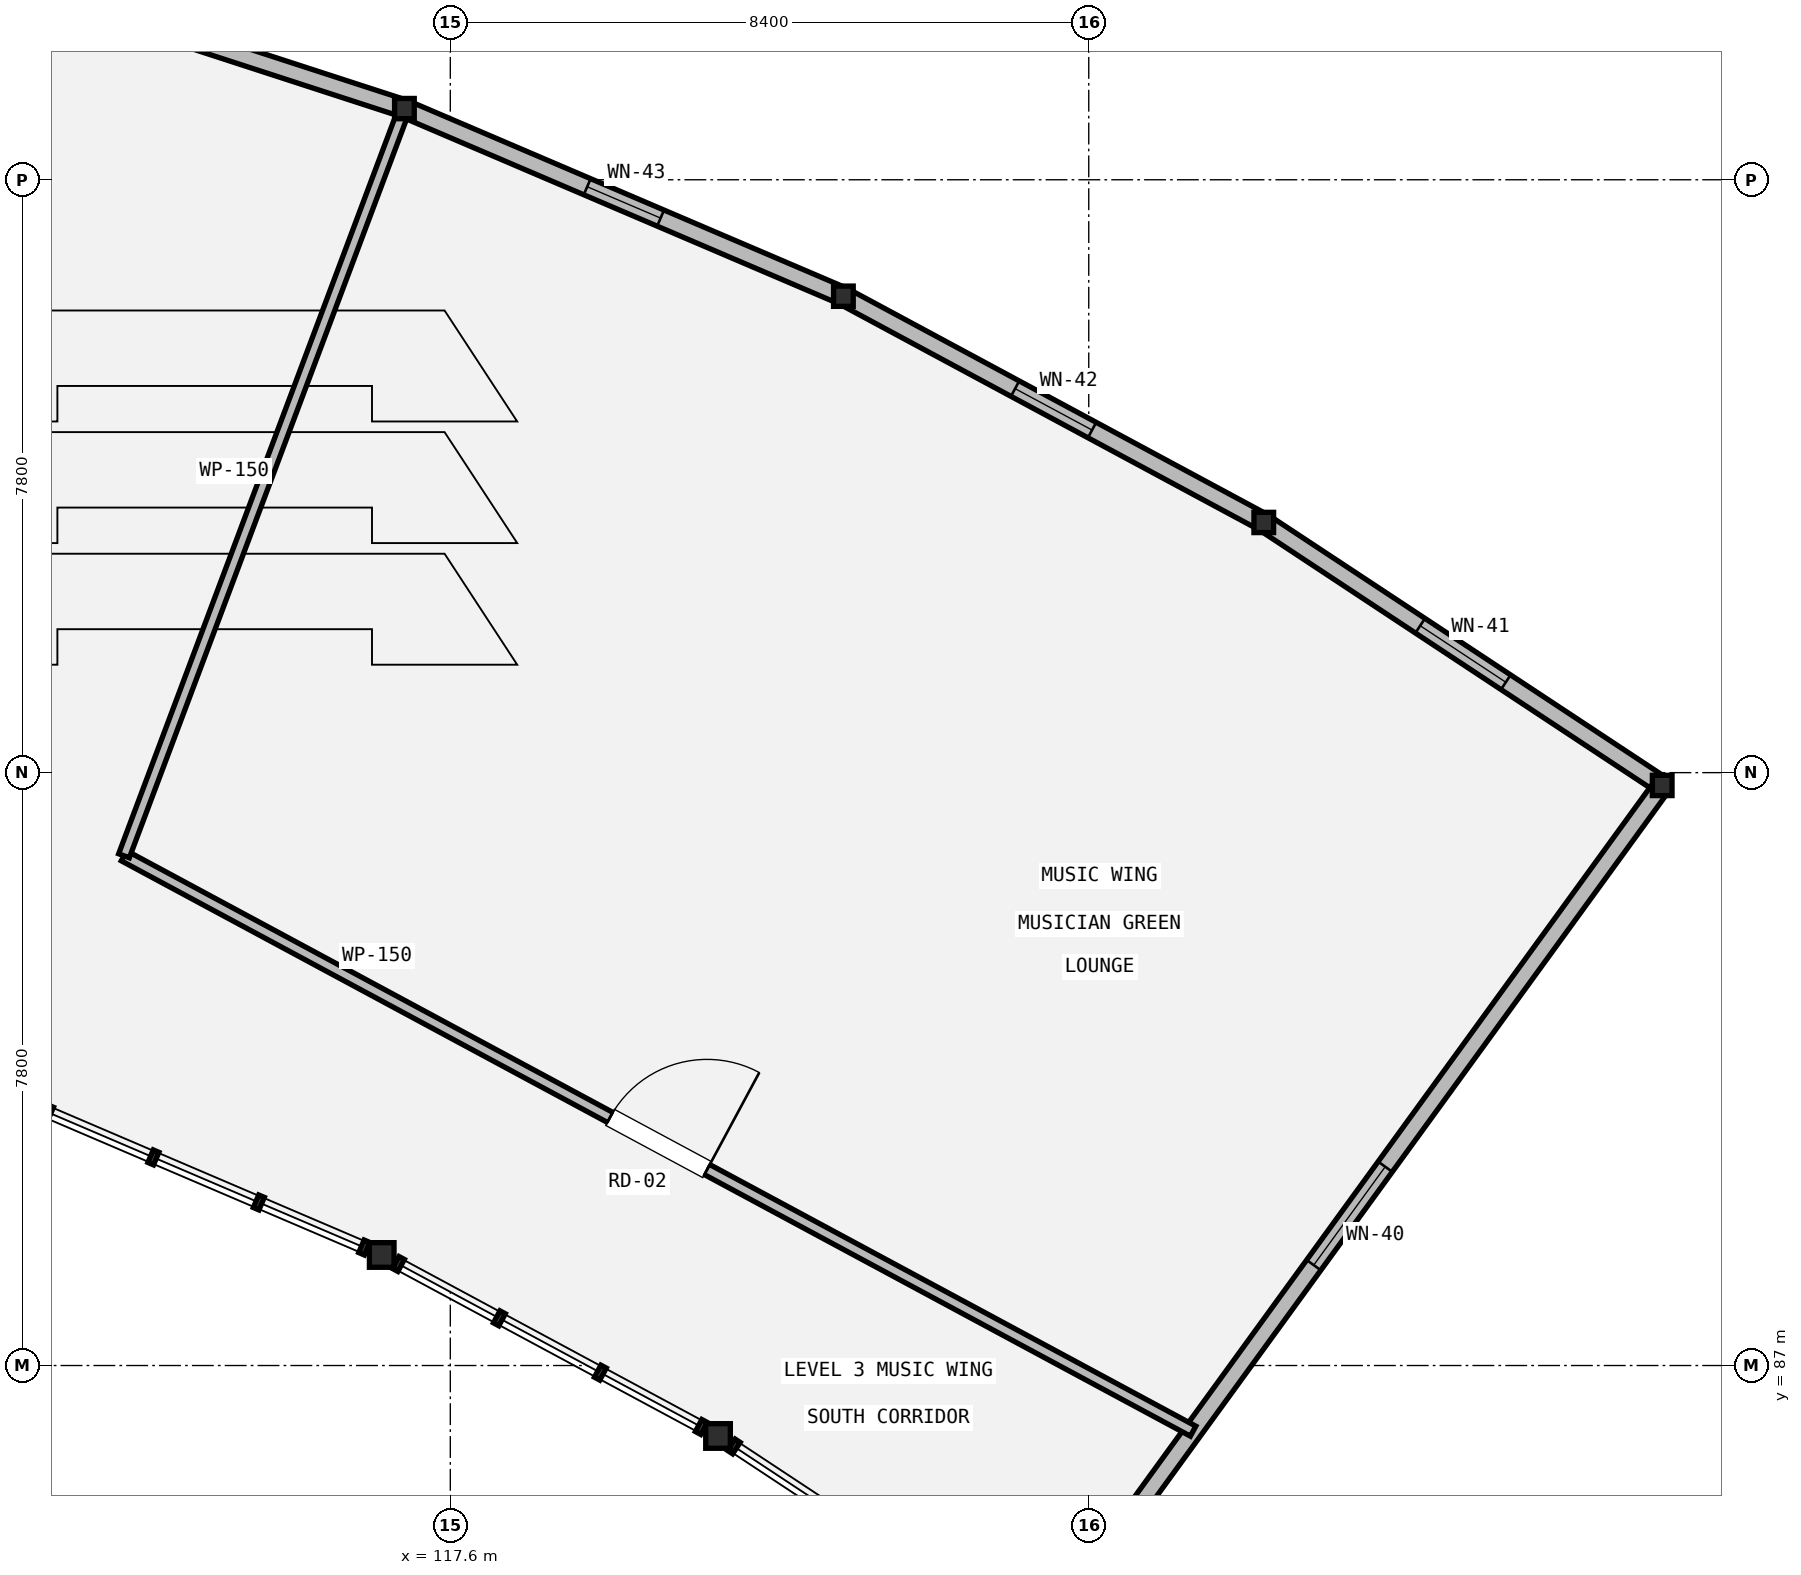
"""IFC4 building model, lengths in metres.
Left out: names, types, materials, properties, quantities, classifications, styles, units other than length and angle.
Written with IfcOpenShell. Run it as: python <this file> out.ifc"""

import sys

from ifc_helpers import new_model, si_unit, direction, frame, frame_2d, origin, origin_2d, place, context, subcontext, project, spatial, rectangle, hollow_circle, i_section, extrude, element, fill, save


model = new_model("IFC4")
c1 = context("Model", 3, precision=1e-05, world=origin(), true_north=direction((0.0, 1.0)))
c2 = subcontext(c1, "Body", "Model", "MODEL_VIEW")
j1 = project(units=[si_unit("LENGTHUNIT", "METRE"), si_unit("PLANEANGLEUNIT", "RADIAN")], contexts=[c1])
p1 = place(None, origin())
s1 = spatial("IfcSite", under=j1, at=p1, CompositionType="ELEMENT")
p2 = place(p1, origin())
s2 = spatial("IfcBuilding", under=s1, at=p2, CompositionType="ELEMENT")
p3 = place(p2, frame((0.0, 0.0, 15.0)))
s3 = spatial("IfcBuildingStorey", under=s2, at=p3, CompositionType="ELEMENT", Elevation=15.0)
p4 = place(p3, frame((116.996, 103.536, 0.0), z_axis=(0.0, 0.0, 1.0), x_axis=(1.0, 0.0, 0.0)))
e1 = element("IfcColumn", 1, at=p4, inside=s3, PredefinedType="COLUMN", context=c2, shape_type="SweptSolid", body=[
    extrude(i_section(OverallWidth=0.259, OverallDepth=0.267, WebThickness=0.013, FlangeThickness=0.021, FilletRadius=0.013, at=origin_2d()), origin(), (0.0, 0.0, 1.0), 4.2),
])
p5 = place(p3, frame((116.698, 88.454, 0.0), z_axis=(0.0, 0.0, 1.0), x_axis=(1.0, 0.0, 0.0)))
e2 = element("IfcColumn", 2, at=p5, inside=s3, PredefinedType="COLUMN", context=c2, shape_type="SweptSolid", body=[
    extrude(hollow_circle(Radius=0.162, WallThickness=0.012, at=origin_2d()), origin(), (0.0, 0.0, 1.0), 4.2),
])
p6 = place(p3, frame((122.772, 101.068, 0.0), z_axis=(0.0, 0.0, 1.0), x_axis=(1.0, 0.0, 0.0)))
e3 = element("IfcColumn", 3, at=p6, inside=s3, PredefinedType="COLUMN", context=c2, shape_type="SweptSolid", body=[
    extrude(i_section(OverallWidth=0.259, OverallDepth=0.267, WebThickness=0.013, FlangeThickness=0.021, FilletRadius=0.013, at=origin_2d()), origin(), (0.0, 0.0, 1.0), 4.2),
])
p7 = place(p3, frame((121.122, 86.073, 0.0), z_axis=(0.0, 0.0, 1.0), x_axis=(1.0, 0.0, 0.0)))
e4 = element("IfcColumn", 4, at=p7, inside=s3, PredefinedType="COLUMN", context=c2, shape_type="SweptSolid", body=[
    extrude(hollow_circle(Radius=0.162, WallThickness=0.012, at=origin_2d()), origin(), (0.0, 0.0, 1.0), 4.2),
])
for number, where, z_axis, x_axis in (
    (5, (128.303, 98.091, 0.0), (0.0, 0.0, 1.0), (1.0, 0.0, 0.0)),
    (6, (133.545, 94.631, 0.0), (0.0, 0.0, 1.0), (1.0, 0.0, 0.0)),
):
    element("IfcColumn", number, at=place(p3, frame(where, z_axis=z_axis, x_axis=x_axis)), inside=s3, PredefinedType="COLUMN", context=c2, shape_type="SweptSolid", body=[
        extrude(i_section(OverallWidth=0.259, OverallDepth=0.267, WebThickness=0.013, FlangeThickness=0.021, FilletRadius=0.013, at=origin_2d()), origin(), (0.0, 0.0, 1.0), 4.2),
    ])
p8 = place(p3, frame((111.023, 105.477, 0.0), z_axis=(0.0, 0.0, 1.0), x_axis=(0.951054348109, -0.309023667285, 0.0)))
e7 = element("IfcWall", 7, at=p8, inside=s3, PredefinedType="STANDARD", context=c2, shape_type="SweptSolid", body=[
    extrude(rectangle(XDim=6.281, YDim=0.23, at=frame_2d((3.14, 0.0))), origin(), (0.0, 0.0, 1.0), 3.477),
])
p9 = place(p3, frame((116.996, 103.536, 0.0), z_axis=(0.0, 0.0, 1.0), x_axis=(0.919540617607, -0.392994977793, 0.0)))
e8 = element("IfcWall", 8, at=p9, inside=s3, PredefinedType="STANDARD", context=c2, shape_type="SweptSolid", body=[
    extrude(rectangle(XDim=6.281, YDim=0.23, at=frame_2d((3.141, 0.0))), origin(), (0.0, 0.0, 1.0), 3.477),
])
p10 = place(p9, frame((2.615, 0.0, 0.9)))
e9 = element("IfcOpeningElement", 9, at=p10, cuts=e8, PredefinedType="OPENING", context=c2, shape_type="SweptSolid", body=[
    extrude(rectangle(XDim=1.05, YDim=1.35, at=frame_2d((0.525, 0.675))), frame((0.0, 0.125, 0.0), z_axis=(0.0, -1.0, 0.0), x_axis=(1.0, 0.0, 0.0)), (0.0, 0.0, 1.0), 0.25),
])
p11 = place(p3, frame((122.772, 101.068, 0.0), z_axis=(0.0, 0.0, 1.0), x_axis=(0.880582156138, -0.473893517883, 0.0)))
e10 = element("IfcWall", 10, at=p11, inside=s3, PredefinedType="STANDARD", context=c2, shape_type="SweptSolid", body=[
    extrude(rectangle(XDim=6.281, YDim=0.23, at=frame_2d((3.141, 0.0))), origin(), (0.0, 0.0, 1.0), 3.477),
])
p12 = place(p11, frame((2.565, 0.0, 0.9)))
e11 = element("IfcOpeningElement", 11, at=p12, cuts=e10, PredefinedType="OPENING", context=c2, shape_type="SweptSolid", body=[
    extrude(rectangle(XDim=1.15, YDim=1.4, at=frame_2d((0.575, 0.7))), frame((0.0, 0.125, 0.0), z_axis=(0.0, -1.0, 0.0), x_axis=(1.0, 0.0, 0.0)), (0.0, 0.0, 1.0), 0.25),
])
p13 = place(p3, frame((128.303, 98.091, 0.0), z_axis=(0.0, 0.0, 1.0), x_axis=(0.834571163011, -0.550900148729, 0.0)))
e12 = element("IfcWall", 12, at=p13, inside=s3, PredefinedType="STANDARD", context=c2, shape_type="SweptSolid", body=[
    extrude(rectangle(XDim=6.281, YDim=0.23, at=frame_2d((3.141, 0.0))), origin(), (0.0, 0.0, 1.0), 3.477),
])
p14 = place(p13, frame((2.466, 0.0, 0.9)))
e13 = element("IfcOpeningElement", 13, at=p14, cuts=e12, PredefinedType="OPENING", context=c2, shape_type="SweptSolid", body=[
    extrude(rectangle(XDim=1.35, YDim=2.2, at=frame_2d((0.675, 1.1))), frame((0.0, 0.125, 0.0), z_axis=(0.0, -1.0, 0.0), x_axis=(1.0, 0.0, 0.0)), (0.0, 0.0, 1.0), 0.25),
])
p15 = place(p3, frame((133.545, 94.631, 0.0), z_axis=(0.0, 0.0, 1.0), x_axis=(-0.587787980643, -0.809015012105, 0.0)))
e14 = element("IfcWall", 14, at=p15, inside=s3, PredefinedType="STANDARD", context=c2, shape_type="SweptSolid", body=[
    extrude(rectangle(XDim=14.0, YDim=0.23, at=frame_2d((7.0, 0.0))), origin(), (0.0, 0.0, 1.0), 3.477),
])
p16 = place(p15, frame((6.2, 0.0, 0.9)))
e15 = element("IfcOpeningElement", 15, at=p16, cuts=e14, PredefinedType="OPENING", context=c2, shape_type="SweptSolid", body=[
    extrude(rectangle(XDim=1.6, YDim=2.2, at=frame_2d((0.8, 1.1))), frame((0.0, 0.125, 0.0), z_axis=(0.0, -1.0, 0.0), x_axis=(1.0, 0.0, 0.0)), (0.0, 0.0, 1.0), 0.25),
])
p17 = place(p3, frame((113.307, 93.706, 0.0), z_axis=(0.0, 0.0, 1.0), x_axis=(0.880592290025, -0.473874686757, 0.0)))
e16 = element("IfcWall", 16, at=p17, inside=s3, PredefinedType="PARTITIONING", context=c2, shape_type="SweptSolid", body=[
    extrude(rectangle(XDim=15.974, YDim=0.15, at=frame_2d((7.987, 0.0))), origin(), (0.0, 0.0, 1.0), 3.477),
])
p18 = place(p17, frame((7.262, 0.0, 0.0)))
e17 = element("IfcOpeningElement", 17, at=p18, cuts=e16, PredefinedType="OPENING", context=c2, shape_type="SweptSolid", body=[
    extrude(rectangle(XDim=1.45, YDim=2.2, at=frame_2d((0.725, 1.1))), frame((0.0, 0.085, 0.0), z_axis=(0.0, -1.0, 0.0), x_axis=(1.0, 0.0, 0.0)), (0.0, 0.0, 1.0), 0.17),
])
p19 = place(p3, frame((113.307, 93.706, 0.0), z_axis=(0.0, 0.0, 1.0), x_axis=(0.351360409251, 0.93624028049, 0.0)))
e18 = element("IfcWall", 18, at=p19, inside=s3, PredefinedType="PARTITIONING", context=c2, shape_type="SweptSolid", body=[
    extrude(rectangle(XDim=10.5, YDim=0.15, at=frame_2d((5.25, 0.0))), origin(), (0.0, 0.0, 1.0), 3.477),
])
p20 = place(p10, origin())
e19 = element("IfcWindow", 19, at=p20, inside=s3, PartitioningType="SINGLE_PANEL", PredefinedType="WINDOW", context=c2, shape_type="SweptSolid", body=[
    extrude(rectangle(XDim=1.05, YDim=1.35, at=frame_2d((0.525, 0.675))), frame((0.0, 0.03, 0.0), z_axis=(0.0, -1.0, 0.0), x_axis=(1.0, 0.0, 0.0)), (0.0, 0.0, 1.0), 0.06),
])
fill(e9, e19)
p21 = place(p12, origin())
e20 = element("IfcWindow", 20, at=p21, inside=s3, PartitioningType="SINGLE_PANEL", PredefinedType="WINDOW", context=c2, shape_type="SweptSolid", body=[
    extrude(rectangle(XDim=1.15, YDim=1.4, at=frame_2d((0.575, 0.7))), frame((0.0, 0.03, 0.0), z_axis=(0.0, -1.0, 0.0), x_axis=(1.0, 0.0, 0.0)), (0.0, 0.0, 1.0), 0.06),
])
fill(e11, e20)
p22 = place(p14, origin())
e21 = element("IfcWindow", 21, at=p22, inside=s3, PartitioningType="SINGLE_PANEL", PredefinedType="WINDOW", context=c2, shape_type="SweptSolid", body=[
    extrude(rectangle(XDim=1.35, YDim=2.2, at=frame_2d((0.675, 1.1))), frame((0.0, 0.03, 0.0), z_axis=(0.0, -1.0, 0.0), x_axis=(1.0, 0.0, 0.0)), (0.0, 0.0, 1.0), 0.06),
])
fill(e13, e21)
p23 = place(p16, origin())
e22 = element("IfcWindow", 22, at=p23, inside=s3, PartitioningType="SINGLE_PANEL", PredefinedType="WINDOW", context=c2, shape_type="SweptSolid", body=[
    extrude(rectangle(XDim=1.6, YDim=2.2, at=frame_2d((0.8, 1.1))), frame((0.0, 0.03, 0.0), z_axis=(0.0, -1.0, 0.0), x_axis=(1.0, 0.0, 0.0)), (0.0, 0.0, 1.0), 0.06),
])
fill(e15, e22)
p24 = place(p18, origin())
e23 = element("IfcDoor", 23, at=p24, inside=s3, OperationType="SINGLE_SWING_RIGHT", PredefinedType="DOOR", context=c2, shape_type="SweptSolid", body=[
    extrude(rectangle(XDim=1.45, YDim=2.2, at=frame_2d((0.725, 1.1))), frame((0.0, 0.025, 0.0), z_axis=(0.0, -1.0, 0.0), x_axis=(1.0, 0.0, 0.0)), (0.0, 0.0, 1.0), 0.05),
])
fill(e17, e23)
save(model, sys.argv[1])
